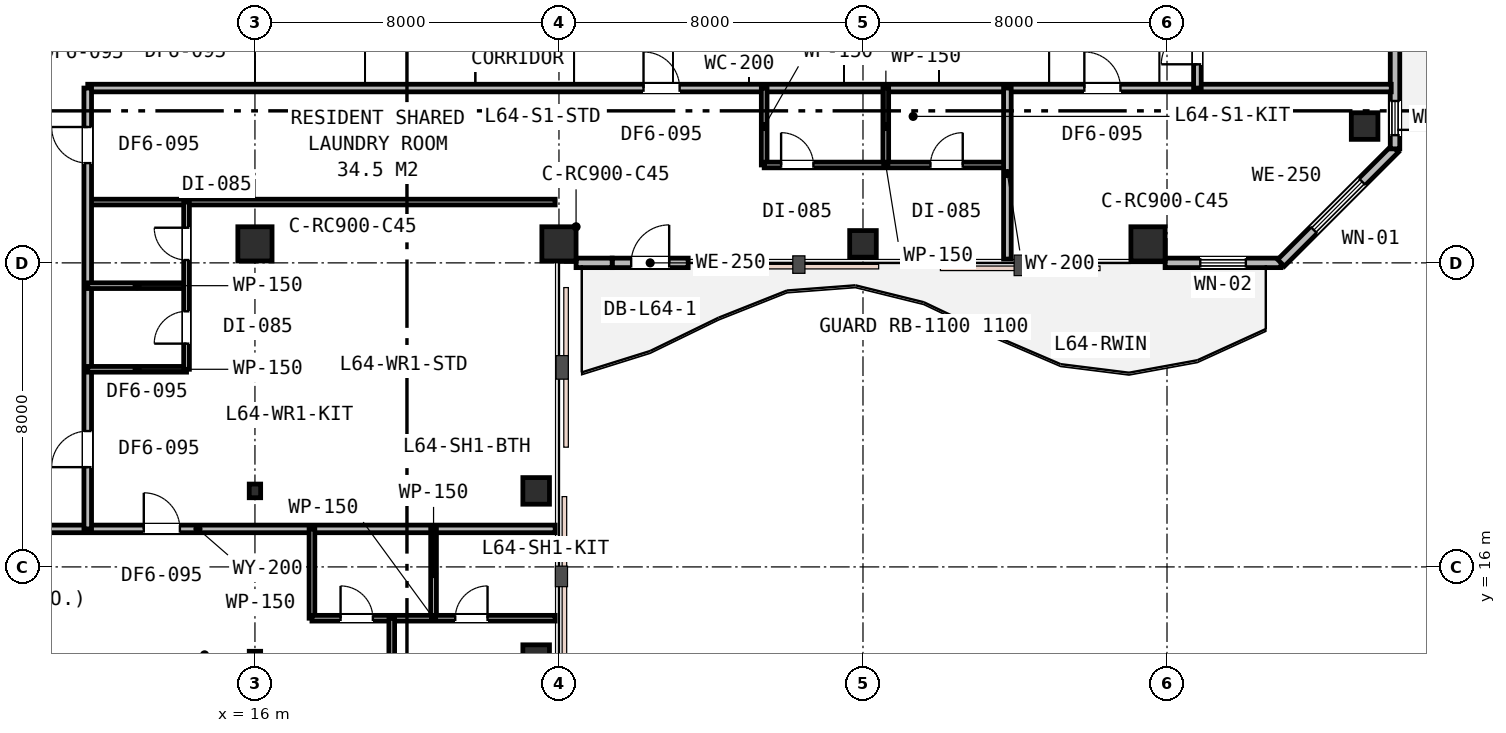
"""IFC4 building model, lengths in metres.
Left out: names, types, materials, properties, quantities, classifications, styles, units other than length and angle.
Written with IfcOpenShell. Run it as: python <this file> out.ifc"""

import sys

from ifc_helpers import new_model, si_unit, direction, frame, frame_2d, origin, origin_2d, place, context, subcontext, project, spatial, rectangle, i_section, extrude, element, fill, save


model = new_model("IFC4")
c1 = context("Model", 3, precision=1e-05, world=origin(), true_north=direction((0.0, 1.0)))
c2 = subcontext(c1, "Body", "Model", "MODEL_VIEW")
j1 = project(units=[si_unit("LENGTHUNIT", "METRE"), si_unit("PLANEANGLEUNIT", "RADIAN")], contexts=[c1])
p1 = place(None, origin())
s1 = spatial("IfcSite", under=j1, at=p1, CompositionType="ELEMENT")
p2 = place(p1, origin())
s2 = spatial("IfcBuilding", under=s1, at=p2, CompositionType="ELEMENT")
p3 = place(p2, frame((0.0, 0.0, 248.8)))
s3 = spatial("IfcBuildingStorey", under=s2, at=p3, CompositionType="ELEMENT", Elevation=248.8)
for number, where, z_axis, x_axis in (
    (1, (16.0, 24.5, 0.0), (0.0, 0.0, 1.0), (1.0, 0.0, 0.0)),
    (2, (24.0, 24.5, 0.0), (0.0, 0.0, 1.0), (1.0, 0.0, 0.0)),
):
    element("IfcColumn", number, at=place(p3, frame(where, z_axis=z_axis, x_axis=x_axis)), inside=s3, PredefinedType="COLUMN", context=c2, shape_type="SweptSolid", body=[
        extrude(rectangle(XDim=0.9, YDim=0.9, at=origin_2d()), origin(), (0.0, 0.0, 1.0), 3.8),
    ])
p4 = place(p3, frame((32.0, 24.5, 0.0), z_axis=(0.0, 0.0, 1.0), x_axis=(1.0, 0.0, 0.0)))
e3 = element("IfcColumn", 3, at=p4, inside=s3, PredefinedType="COLUMN", context=c2, shape_type="SweptSolid", body=[
    extrude(rectangle(XDim=0.7, YDim=0.7, at=origin_2d()), origin(), (0.0, 0.0, 1.0), 3.8),
])
p5 = place(p3, frame((39.5, 24.5, 0.0), z_axis=(0.0, 0.0, 1.0), x_axis=(1.0, 0.0, 0.0)))
e4 = element("IfcColumn", 4, at=p5, inside=s3, PredefinedType="COLUMN", context=c2, shape_type="SweptSolid", body=[
    extrude(rectangle(XDim=0.9, YDim=0.9, at=origin_2d()), origin(), (0.0, 0.0, 1.0), 3.8),
])
for number, where, z_axis, x_axis in (
    (5, (45.2, 27.6, 0.0), (0.0, 0.0, 1.0), (1.0, 0.0, 0.0)),
    (6, (23.4, 13.6, 0.0), (0.0, 0.0, 1.0), (1.0, 0.0, 0.0)),
    (7, (23.4, 18.0, 0.0), (0.0, 0.0, 1.0), (1.0, 0.0, 0.0)),
):
    element("IfcColumn", number, at=place(p3, frame(where, z_axis=z_axis, x_axis=x_axis)), inside=s3, PredefinedType="COLUMN", context=c2, shape_type="SweptSolid", body=[
        extrude(rectangle(XDim=0.7, YDim=0.7, at=origin_2d()), origin(), (0.0, 0.0, 1.0), 3.8),
    ])
for number, where, z_axis, x_axis in (
    (8, (16.0, 13.6, 0.0), (0.0, 0.0, 1.0), (1.0, 0.0, 0.0)),
    (9, (16.0, 18.0, 0.0), (0.0, 0.0, 1.0), (1.0, 0.0, 0.0)),
):
    element("IfcColumn", number, at=place(p3, frame(where, z_axis=z_axis, x_axis=x_axis)), inside=s3, PredefinedType="COLUMN", context=c2, shape_type="SweptSolid", body=[
        extrude(i_section(OverallWidth=0.3, OverallDepth=0.36, WebThickness=0.013, FlangeThickness=0.022, FilletRadius=0.027, at=origin_2d()), origin(), (0.0, 0.0, 1.0), 3.8),
    ])
p6 = place(p3, frame((25.4, 24.0, 0.0), z_axis=(0.0, 0.0, 1.0), x_axis=(1.0, 0.0, 0.0)))
e10 = element("IfcWall", 10, at=p6, inside=s3, PredefinedType="STANDARD", context=c2, shape_type="SweptSolid", body=[
    extrude(rectangle(XDim=2.0, YDim=0.25, at=frame_2d((1.0, 0.0))), origin(), (0.0, 0.0, 1.0), 3.27),
])
p7 = place(p6, frame((0.5, 0.0, 0.0)))
e11 = element("IfcOpeningElement", 11, at=p7, cuts=e10, PredefinedType="OPENING", context=c2, shape_type="SweptSolid", body=[
    extrude(rectangle(XDim=1.0, YDim=2.15, at=frame_2d((0.5, 1.075))), frame((0.0, 0.135, 0.0), z_axis=(0.0, -1.0, 0.0), x_axis=(1.0, 0.0, 0.0)), (0.0, 0.0, 1.0), 0.27),
])
p8 = place(p3, frame((24.45, 24.0, 0.0), z_axis=(0.0, 0.0, 1.0), x_axis=(1.0, 0.0, 0.0)))
e12 = element("IfcWall", 12, at=p8, inside=s3, PredefinedType="STANDARD", context=c2, shape_type="SweptSolid", body=[
    extrude(rectangle(XDim=0.95, YDim=0.25, at=frame_2d((0.475, 0.0))), origin(), (0.0, 0.0, 1.0), 3.27),
])
p9 = place(p3, frame((39.95, 24.0, 0.0), z_axis=(0.0, 0.0, 1.0), x_axis=(1.0, 0.0, 0.0)))
e13 = element("IfcWall", 13, at=p9, inside=s3, PredefinedType="STANDARD", context=c2, shape_type="SweptSolid", body=[
    extrude(rectangle(XDim=3.05, YDim=0.25, at=frame_2d((1.525, 0.0))), origin(), (0.0, 0.0, 1.0), 3.53),
])
p10 = place(p9, frame((0.925, 0.0, 0.85)))
e14 = element("IfcOpeningElement", 14, at=p10, cuts=e13, PredefinedType="OPENING", context=c2, shape_type="SweptSolid", body=[
    extrude(rectangle(XDim=1.2, YDim=1.6, at=frame_2d((0.6, 0.8))), frame((0.0, 0.135, 0.0), z_axis=(0.0, -1.0, 0.0), x_axis=(1.0, 0.0, 0.0)), (0.0, 0.0, 1.0), 0.27),
])
p11 = place(p3, frame((43.0, 24.0, 0.0), z_axis=(0.0, 0.0, 1.0), x_axis=(0.707106781187, 0.707106781187, 0.0)))
e15 = element("IfcWall", 15, at=p11, inside=s3, PredefinedType="STANDARD", context=c2, shape_type="SweptSolid", body=[
    extrude(rectangle(XDim=4.243, YDim=0.25, at=frame_2d((2.121, 0.0))), origin(), (0.0, 0.0, 1.0), 3.53),
])
p12 = place(p11, frame((1.221, 0.0, 0.75)))
e16 = element("IfcOpeningElement", 16, at=p12, cuts=e15, PredefinedType="OPENING", context=c2, shape_type="SweptSolid", body=[
    extrude(rectangle(XDim=1.8, YDim=1.85, at=frame_2d((0.9, 0.925))), frame((0.0, 0.135, 0.0), z_axis=(0.0, -1.0, 0.0), x_axis=(1.0, 0.0, 0.0)), (0.0, 0.0, 1.0), 0.27),
])
p13 = place(p3, frame((46.0, 27.0, 0.0), z_axis=(0.0, 0.0, 1.0), x_axis=(0.0, 1.0, 0.0)))
e17 = element("IfcWall", 17, at=p13, inside=s3, PredefinedType="STANDARD", context=c2, shape_type="SweptSolid", body=[
    extrude(rectangle(XDim=2.9, YDim=0.25, at=frame_2d((1.45, 0.0))), origin(), (0.0, 0.0, 1.0), 3.53),
])
p14 = place(p13, frame((0.36, 0.0, 0.9)))
e18 = element("IfcOpeningElement", 18, at=p14, cuts=e17, PredefinedType="OPENING", context=c2, shape_type="SweptSolid", body=[
    extrude(rectangle(XDim=0.9, YDim=1.55, at=frame_2d((0.45, 0.775))), frame((0.0, 0.135, 0.0), z_axis=(0.0, -1.0, 0.0), x_axis=(1.0, 0.0, 0.0)), (0.0, 0.0, 1.0), 0.27),
])
p15 = place(p3, frame((11.6, 28.6, 0.0), z_axis=(0.0, 0.0, 1.0), x_axis=(1.0, 0.0, 0.0)))
e19 = element("IfcWall", 19, at=p15, inside=s3, PredefinedType="PARTITIONING", context=c2, shape_type="SweptSolid", body=[
    extrude(rectangle(XDim=34.3, YDim=0.2, at=frame_2d((17.15, 0.0))), origin(), (0.0, 0.0, 1.0), 3.16),
])
p16 = place(p15, frame((14.625, 0.0, 0.0)))
e20 = element("IfcOpeningElement", 20, at=p16, cuts=e19, PredefinedType="OPENING", context=c2, shape_type="SweptSolid", body=[
    extrude(rectangle(XDim=0.95, YDim=2.15, at=frame_2d((0.475, 1.075))), frame((0.0, 0.11, 0.0), z_axis=(0.0, -1.0, 0.0), x_axis=(1.0, 0.0, 0.0)), (0.0, 0.0, 1.0), 0.22),
])
p17 = place(p15, frame((26.225, 0.0, 0.0)))
e21 = element("IfcOpeningElement", 21, at=p17, cuts=e19, PredefinedType="OPENING", context=c2, shape_type="SweptSolid", body=[
    extrude(rectangle(XDim=0.95, YDim=2.15, at=frame_2d((0.475, 1.075))), frame((0.0, 0.11, 0.0), z_axis=(0.0, -1.0, 0.0), x_axis=(1.0, 0.0, 0.0)), (0.0, 0.0, 1.0), 0.22),
])
p18 = place(p3, frame((40.8, 28.6, 0.0), z_axis=(0.0, 0.0, 1.0), x_axis=(0.0, 1.0, 0.0)))
e22 = element("IfcWall", 22, at=p18, inside=s3, PredefinedType="PARTITIONING", context=c2, shape_type="SweptSolid", body=[
    extrude(rectangle(XDim=14.3, YDim=0.2, at=frame_2d((7.15, 0.0))), origin(), (0.0, 0.0, 1.0), 3.16),
])
p19 = place(p18, frame((0.625, 0.0, 0.0)))
e23 = element("IfcOpeningElement", 23, at=p19, cuts=e22, PredefinedType="OPENING", context=c2, shape_type="SweptSolid", body=[
    extrude(rectangle(XDim=0.95, YDim=2.15, at=frame_2d((0.475, 1.075))), frame((0.0, 0.11, 0.0), z_axis=(0.0, -1.0, 0.0), x_axis=(1.0, 0.0, 0.0)), (0.0, 0.0, 1.0), 0.22),
])
p20 = place(p3, frame((29.4, 26.576, 0.0), z_axis=(0.0, 0.0, 1.0), x_axis=(0.0, 1.0, 0.0)))
e24 = element("IfcWall", 24, at=p20, inside=s3, PredefinedType="PARTITIONING", context=c2, shape_type="SweptSolid", body=[
    extrude(rectangle(XDim=2.024, YDim=0.15, at=frame_2d((1.012, 0.0))), origin(), (0.0, 0.0, 1.0), 3.28),
])
p21 = place(p3, frame((32.6, 26.576, 0.0), z_axis=(0.0, 0.0, 1.0), x_axis=(0.0, 1.0, 0.0)))
e25 = element("IfcWall", 25, at=p21, inside=s3, PredefinedType="PARTITIONING", context=c2, shape_type="SweptSolid", body=[
    extrude(rectangle(XDim=2.024, YDim=0.15, at=frame_2d((1.012, 0.0))), origin(), (0.0, 0.0, 1.0), 3.53),
])
p22 = place(p3, frame((29.4, 26.576, 0.0), z_axis=(0.0, 0.0, 1.0), x_axis=(1.0, 0.0, 0.0)))
e26 = element("IfcWall", 26, at=p22, inside=s3, PredefinedType="PARTITIONING", context=c2, shape_type="SweptSolid", body=[
    extrude(rectangle(XDim=6.4, YDim=0.15, at=frame_2d((3.2, 0.0))), origin(), (0.0, 0.0, 1.0), 3.16),
])
p23 = place(p22, frame((0.445, 0.0, 0.0)))
e27 = element("IfcOpeningElement", 27, at=p23, cuts=e26, PredefinedType="OPENING", context=c2, shape_type="SweptSolid", body=[
    extrude(rectangle(XDim=0.85, YDim=2.15, at=frame_2d((0.425, 1.075))), frame((0.0, 0.085, 0.0), z_axis=(0.0, -1.0, 0.0), x_axis=(1.0, 0.0, 0.0)), (0.0, 0.0, 1.0), 0.17),
])
p24 = place(p22, frame((4.375, 0.0, 0.0)))
e28 = element("IfcOpeningElement", 28, at=p24, cuts=e26, PredefinedType="OPENING", context=c2, shape_type="SweptSolid", body=[
    extrude(rectangle(XDim=0.85, YDim=2.15, at=frame_2d((0.425, 1.075))), frame((0.0, 0.085, 0.0), z_axis=(0.0, -1.0, 0.0), x_axis=(1.0, 0.0, 0.0)), (0.0, 0.0, 1.0), 0.17),
])
p25 = place(p3, frame((35.8, 24.1, 0.0), z_axis=(0.0, 0.0, 1.0), x_axis=(0.0, 1.0, 0.0)))
e29 = element("IfcWall", 29, at=p25, inside=s3, PredefinedType="PARTITIONING", context=c2, shape_type="SweptSolid", body=[
    extrude(rectangle(XDim=4.5, YDim=0.2, at=frame_2d((2.25, 0.0))), origin(), (0.0, 0.0, 1.0), 3.27),
])
p26 = place(p3, frame((5.1, 17.0, 0.0), z_axis=(0.0, 0.0, 1.0), x_axis=(1.0, 0.0, 0.0)))
e30 = element("IfcWall", 30, at=p26, inside=s3, PredefinedType="PARTITIONING", context=c2, shape_type="SweptSolid", body=[
    extrude(rectangle(XDim=18.8, YDim=0.2, at=frame_2d((9.4, 0.0))), origin(), (0.0, 0.0, 1.0), 3.16),
])
p27 = place(p26, frame((7.975, 0.0, 0.0)))
e31 = element("IfcOpeningElement", 31, at=p27, cuts=e30, PredefinedType="OPENING", context=c2, shape_type="SweptSolid", body=[
    extrude(rectangle(XDim=0.95, YDim=2.15, at=frame_2d((0.475, 1.075))), frame((0.0, 0.11, 0.0), z_axis=(0.0, -1.0, 0.0), x_axis=(1.0, 0.0, 0.0)), (0.0, 0.0, 1.0), 0.22),
])
p28 = place(p3, frame((11.6, 25.6, 0.0), z_axis=(0.0, 0.0, 1.0), x_axis=(1.0, 0.0, 0.0)))
e32 = element("IfcWall", 32, at=p28, inside=s3, PredefinedType="PARTITIONING", context=c2, shape_type="SweptSolid", body=[
    extrude(rectangle(XDim=12.3, YDim=0.15, at=frame_2d((6.15, 0.0))), origin(), (0.0, 0.0, 1.0), 3.16),
])
p29 = place(p3, frame((11.6, 17.0, 0.0), z_axis=(0.0, 0.0, 1.0), x_axis=(0.0, 1.0, 0.0)))
e33 = element("IfcWall", 33, at=p29, inside=s3, PredefinedType="PARTITIONING", context=c2, shape_type="SweptSolid", body=[
    extrude(rectangle(XDim=11.6, YDim=0.2, at=frame_2d((5.8, 0.0))), origin(), (0.0, 0.0, 1.0), 3.16),
])
p30 = place(p29, frame((9.625, 0.0, 0.0)))
e34 = element("IfcOpeningElement", 34, at=p30, cuts=e33, PredefinedType="OPENING", context=c2, shape_type="SweptSolid", body=[
    extrude(rectangle(XDim=0.95, YDim=2.15, at=frame_2d((0.475, 1.075))), frame((0.0, 0.11, 0.0), z_axis=(0.0, -1.0, 0.0), x_axis=(1.0, 0.0, 0.0)), (0.0, 0.0, 1.0), 0.22),
])
p31 = place(p29, frame((1.625, 0.0, 0.0)))
e35 = element("IfcOpeningElement", 35, at=p31, cuts=e33, PredefinedType="OPENING", context=c2, shape_type="SweptSolid", body=[
    extrude(rectangle(XDim=0.95, YDim=2.15, at=frame_2d((0.475, 1.075))), frame((0.0, 0.11, 0.0), z_axis=(0.0, -1.0, 0.0), x_axis=(1.0, 0.0, 0.0)), (0.0, 0.0, 1.0), 0.22),
])
for number, where, z_axis, x_axis in (
    (36, (11.6, 21.2, 0.0), (0.0, 0.0, 1.0), (1.0, 0.0, 0.0)),
    (37, (11.6, 23.4, 0.0), (0.0, 0.0, 1.0), (1.0, 0.0, 0.0)),
):
    element("IfcWall", number, at=place(p3, frame(where, z_axis=z_axis, x_axis=x_axis)), inside=s3, PredefinedType="PARTITIONING", context=c2, shape_type="SweptSolid", body=[
        extrude(rectangle(XDim=2.6, YDim=0.15, at=frame_2d((1.3, 0.0))), origin(), (0.0, 0.0, 1.0), 3.53),
    ])
p32 = place(p3, frame((14.2, 21.2, 0.0), z_axis=(0.0, 0.0, 1.0), x_axis=(0.0, 1.0, 0.0)))
e38 = element("IfcWall", 38, at=p32, inside=s3, PredefinedType="PARTITIONING", context=c2, shape_type="SweptSolid", body=[
    extrude(rectangle(XDim=4.4, YDim=0.15, at=frame_2d((2.2, 0.0))), origin(), (0.0, 0.0, 1.0), 3.16),
])
p33 = place(p32, frame((0.675, 0.0, 0.0)))
e39 = element("IfcOpeningElement", 39, at=p33, cuts=e38, PredefinedType="OPENING", context=c2, shape_type="SweptSolid", body=[
    extrude(rectangle(XDim=0.85, YDim=2.15, at=frame_2d((0.425, 1.075))), frame((0.0, 0.085, 0.0), z_axis=(0.0, -1.0, 0.0), x_axis=(1.0, 0.0, 0.0)), (0.0, 0.0, 1.0), 0.17),
])
p34 = place(p32, frame((2.875, 0.0, 0.0)))
e40 = element("IfcOpeningElement", 40, at=p34, cuts=e38, PredefinedType="OPENING", context=c2, shape_type="SweptSolid", body=[
    extrude(rectangle(XDim=0.85, YDim=2.15, at=frame_2d((0.425, 1.075))), frame((0.0, 0.085, 0.0), z_axis=(0.0, -1.0, 0.0), x_axis=(1.0, 0.0, 0.0)), (0.0, 0.0, 1.0), 0.17),
])
p35 = place(p3, frame((17.5, 14.65, 0.0), z_axis=(0.0, 0.0, 1.0), x_axis=(0.0, 1.0, 0.0)))
e41 = element("IfcWall", 41, at=p35, inside=s3, PredefinedType="PARTITIONING", context=c2, shape_type="SweptSolid", body=[
    extrude(rectangle(XDim=2.35, YDim=0.15, at=frame_2d((1.175, 0.0))), origin(), (0.0, 0.0, 1.0), 3.53),
])
p36 = place(p3, frame((20.7, 14.65, 0.0), z_axis=(0.0, 0.0, 1.0), x_axis=(0.0, 1.0, 0.0)))
e42 = element("IfcWall", 42, at=p36, inside=s3, PredefinedType="PARTITIONING", context=c2, shape_type="SweptSolid", body=[
    extrude(rectangle(XDim=2.35, YDim=0.15, at=frame_2d((1.175, 0.0))), origin(), (0.0, 0.0, 1.0), 3.28),
])
p37 = place(p3, frame((17.5, 14.65, 0.0), z_axis=(0.0, 0.0, 1.0), x_axis=(1.0, 0.0, 0.0)))
e43 = element("IfcWall", 43, at=p37, inside=s3, PredefinedType="PARTITIONING", context=c2, shape_type="SweptSolid", body=[
    extrude(rectangle(XDim=6.4, YDim=0.15, at=frame_2d((3.2, 0.0))), origin(), (0.0, 0.0, 1.0), 3.27),
])
p38 = place(p37, frame((0.753, 0.0, 0.0)))
e44 = element("IfcOpeningElement", 44, at=p38, cuts=e43, PredefinedType="OPENING", context=c2, shape_type="SweptSolid", body=[
    extrude(rectangle(XDim=0.85, YDim=2.15, at=frame_2d((0.425, 1.075))), frame((0.0, 0.085, 0.0), z_axis=(0.0, -1.0, 0.0), x_axis=(1.0, 0.0, 0.0)), (0.0, 0.0, 1.0), 0.17),
])
p39 = place(p37, frame((3.771, 0.0, 0.0)))
e45 = element("IfcOpeningElement", 45, at=p39, cuts=e43, PredefinedType="OPENING", context=c2, shape_type="SweptSolid", body=[
    extrude(rectangle(XDim=0.85, YDim=2.15, at=frame_2d((0.425, 1.075))), frame((0.0, 0.085, 0.0), z_axis=(0.0, -1.0, 0.0), x_axis=(1.0, 0.0, 0.0)), (0.0, 0.0, 1.0), 0.17),
])
p40 = place(p3, frame((19.6, 10.1, 0.0), z_axis=(0.0, 0.0, 1.0), x_axis=(0.0, 1.0, 0.0)))
e46 = element("IfcWall", 46, at=p40, inside=s3, PredefinedType="PARTITIONING", context=c2, shape_type="SweptSolid", body=[
    extrude(rectangle(XDim=4.55, YDim=0.15, at=frame_2d((2.275, 0.0))), origin(), (0.0, 0.0, 1.0), 3.16),
])
p41 = place(p40, frame((1.825, 0.0, 0.0)))
e47 = element("IfcOpeningElement", 47, at=p41, cuts=e46, PredefinedType="OPENING", context=c2, shape_type="SweptSolid", body=[
    extrude(rectangle(XDim=0.9, YDim=2.15, at=frame_2d((0.45, 1.075))), frame((0.0, 0.085, 0.0), z_axis=(0.0, -1.0, 0.0), x_axis=(1.0, 0.0, 0.0)), (0.0, 0.0, 1.0), 0.17),
])
p42 = place(p7, origin())
e48 = element("IfcDoor", 48, at=p42, inside=s3, OperationType="SINGLE_SWING_RIGHT", PredefinedType="DOOR", context=c2, shape_type="SweptSolid", body=[
    extrude(rectangle(XDim=1.0, YDim=2.15, at=frame_2d((0.5, 1.075))), frame((0.0, 0.025, 0.0), z_axis=(0.0, -1.0, 0.0), x_axis=(1.0, 0.0, 0.0)), (0.0, 0.0, 1.0), 0.05),
])
fill(e11, e48)
p43 = place(p10, origin())
e49 = element("IfcWindow", 49, at=p43, inside=s3, PartitioningType="SINGLE_PANEL", PredefinedType="WINDOW", context=c2, shape_type="SweptSolid", body=[
    extrude(rectangle(XDim=1.2, YDim=1.6, at=frame_2d((0.6, 0.8))), frame((0.0, 0.03, 0.0), z_axis=(0.0, -1.0, 0.0), x_axis=(1.0, 0.0, 0.0)), (0.0, 0.0, 1.0), 0.06),
])
fill(e14, e49)
p44 = place(p12, origin())
e50 = element("IfcWindow", 50, at=p44, inside=s3, PartitioningType="SINGLE_PANEL", PredefinedType="WINDOW", context=c2, shape_type="SweptSolid", body=[
    extrude(rectangle(XDim=1.8, YDim=1.85, at=frame_2d((0.9, 0.925))), frame((0.0, 0.03, 0.0), z_axis=(0.0, -1.0, 0.0), x_axis=(1.0, 0.0, 0.0)), (0.0, 0.0, 1.0), 0.06),
])
fill(e16, e50)
p45 = place(p14, origin())
e51 = element("IfcWindow", 51, at=p45, inside=s3, PartitioningType="SINGLE_PANEL", PredefinedType="WINDOW", context=c2, shape_type="SweptSolid", body=[
    extrude(rectangle(XDim=0.9, YDim=1.55, at=frame_2d((0.45, 0.775))), frame((0.0, 0.03, 0.0), z_axis=(0.0, -1.0, 0.0), x_axis=(1.0, 0.0, 0.0)), (0.0, 0.0, 1.0), 0.06),
])
fill(e18, e51)
p46 = place(p19, origin())
e52 = element("IfcDoor", 52, at=p46, inside=s3, OperationType="SINGLE_SWING_LEFT", PredefinedType="DOOR", context=c2, shape_type="SweptSolid", body=[
    extrude(rectangle(XDim=0.95, YDim=2.15, at=frame_2d((0.475, 1.075))), frame((0.0, 0.025, 0.0), z_axis=(0.0, -1.0, 0.0), x_axis=(1.0, 0.0, 0.0)), (0.0, 0.0, 1.0), 0.05),
])
fill(e23, e52)
p47 = place(p16, origin())
e53 = element("IfcDoor", 53, at=p47, inside=s3, OperationType="SINGLE_SWING_LEFT", PredefinedType="DOOR", context=c2, shape_type="SweptSolid", body=[
    extrude(rectangle(XDim=0.95, YDim=2.15, at=frame_2d((0.475, 1.075))), frame((0.0, 0.025, 0.0), z_axis=(0.0, -1.0, 0.0), x_axis=(1.0, 0.0, 0.0)), (0.0, 0.0, 1.0), 0.05),
])
fill(e20, e53)
p48 = place(p23, origin())
e54 = element("IfcDoor", 54, at=p48, inside=s3, OperationType="SINGLE_SWING_LEFT", PredefinedType="DOOR", context=c2, shape_type="SweptSolid", body=[
    extrude(rectangle(XDim=0.85, YDim=2.15, at=frame_2d((0.425, 1.075))), frame((0.0, 0.025, 0.0), z_axis=(0.0, -1.0, 0.0), x_axis=(1.0, 0.0, 0.0)), (0.0, 0.0, 1.0), 0.05),
])
fill(e27, e54)
p49 = place(p24, origin())
e55 = element("IfcDoor", 55, at=p49, inside=s3, OperationType="SINGLE_SWING_RIGHT", PredefinedType="DOOR", context=c2, shape_type="SweptSolid", body=[
    extrude(rectangle(XDim=0.85, YDim=2.15, at=frame_2d((0.425, 1.075))), frame((0.0, 0.025, 0.0), z_axis=(0.0, -1.0, 0.0), x_axis=(1.0, 0.0, 0.0)), (0.0, 0.0, 1.0), 0.05),
])
fill(e28, e55)
p50 = place(p17, origin())
e56 = element("IfcDoor", 56, at=p50, inside=s3, OperationType="SINGLE_SWING_LEFT", PredefinedType="DOOR", context=c2, shape_type="SweptSolid", body=[
    extrude(rectangle(XDim=0.95, YDim=2.15, at=frame_2d((0.475, 1.075))), frame((0.0, 0.025, 0.0), z_axis=(0.0, -1.0, 0.0), x_axis=(1.0, 0.0, 0.0)), (0.0, 0.0, 1.0), 0.05),
])
fill(e21, e56)
p51 = place(p30, origin())
e57 = element("IfcDoor", 57, at=p51, inside=s3, OperationType="SINGLE_SWING_RIGHT", PredefinedType="DOOR", context=c2, shape_type="SweptSolid", body=[
    extrude(rectangle(XDim=0.95, YDim=2.15, at=frame_2d((0.475, 1.075))), frame((0.0, 0.025, 0.0), z_axis=(0.0, -1.0, 0.0), x_axis=(1.0, 0.0, 0.0)), (0.0, 0.0, 1.0), 0.05),
])
fill(e34, e57)
p52 = place(p31, origin())
e58 = element("IfcDoor", 58, at=p52, inside=s3, OperationType="SINGLE_SWING_LEFT", PredefinedType="DOOR", context=c2, shape_type="SweptSolid", body=[
    extrude(rectangle(XDim=0.95, YDim=2.15, at=frame_2d((0.475, 1.075))), frame((0.0, 0.025, 0.0), z_axis=(0.0, -1.0, 0.0), x_axis=(1.0, 0.0, 0.0)), (0.0, 0.0, 1.0), 0.05),
])
fill(e35, e58)
p53 = place(p33, origin())
e59 = element("IfcDoor", 59, at=p53, inside=s3, OperationType="SINGLE_SWING_LEFT", PredefinedType="DOOR", context=c2, shape_type="SweptSolid", body=[
    extrude(rectangle(XDim=0.85, YDim=2.15, at=frame_2d((0.425, 1.075))), frame((0.0, 0.025, 0.0), z_axis=(0.0, -1.0, 0.0), x_axis=(1.0, 0.0, 0.0)), (0.0, 0.0, 1.0), 0.05),
])
fill(e39, e59)
p54 = place(p34, origin())
e60 = element("IfcDoor", 60, at=p54, inside=s3, OperationType="SINGLE_SWING_RIGHT", PredefinedType="DOOR", context=c2, shape_type="SweptSolid", body=[
    extrude(rectangle(XDim=0.85, YDim=2.15, at=frame_2d((0.425, 1.075))), frame((0.0, 0.025, 0.0), z_axis=(0.0, -1.0, 0.0), x_axis=(1.0, 0.0, 0.0)), (0.0, 0.0, 1.0), 0.05),
])
fill(e40, e60)
p55 = place(p27, origin())
e61 = element("IfcDoor", 61, at=p55, inside=s3, OperationType="SINGLE_SWING_LEFT", PredefinedType="DOOR", context=c2, shape_type="SweptSolid", body=[
    extrude(rectangle(XDim=0.95, YDim=2.15, at=frame_2d((0.475, 1.075))), frame((0.0, 0.025, 0.0), z_axis=(0.0, -1.0, 0.0), x_axis=(1.0, 0.0, 0.0)), (0.0, 0.0, 1.0), 0.05),
])
fill(e31, e61)
p56 = place(p38, origin())
e62 = element("IfcDoor", 62, at=p56, inside=s3, OperationType="SINGLE_SWING_LEFT", PredefinedType="DOOR", context=c2, shape_type="SweptSolid", body=[
    extrude(rectangle(XDim=0.85, YDim=2.15, at=frame_2d((0.425, 1.075))), frame((0.0, 0.025, 0.0), z_axis=(0.0, -1.0, 0.0), x_axis=(1.0, 0.0, 0.0)), (0.0, 0.0, 1.0), 0.05),
])
fill(e44, e62)
p57 = place(p39, origin())
e63 = element("IfcDoor", 63, at=p57, inside=s3, OperationType="SINGLE_SWING_RIGHT", PredefinedType="DOOR", context=c2, shape_type="SweptSolid", body=[
    extrude(rectangle(XDim=0.85, YDim=2.15, at=frame_2d((0.425, 1.075))), frame((0.0, 0.025, 0.0), z_axis=(0.0, -1.0, 0.0), x_axis=(1.0, 0.0, 0.0)), (0.0, 0.0, 1.0), 0.05),
])
fill(e45, e63)
save(model, sys.argv[1])
